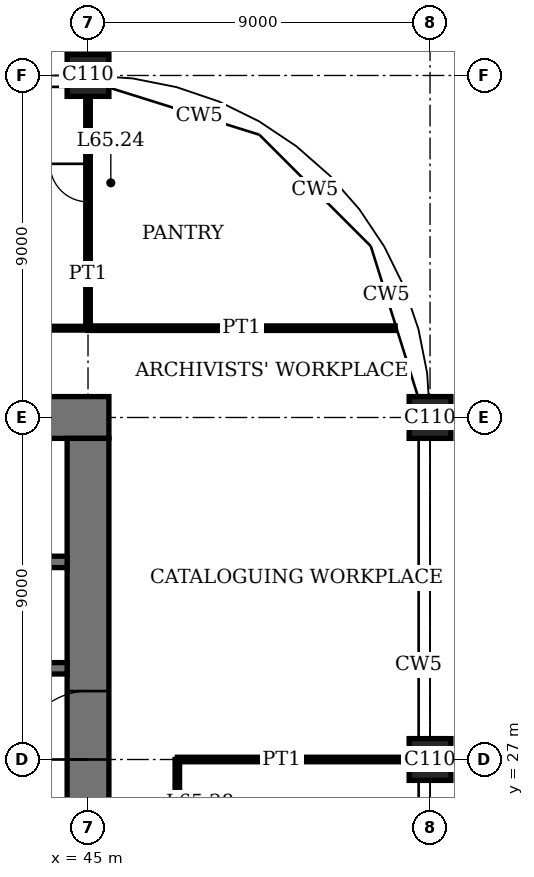
"""IFC4 building model, lengths in metres.
Left out: names, types, materials, properties, quantities, classifications, styles, units other than length and angle.
Written with IfcOpenShell. Run it as: python <this file> out.ifc"""

import sys

from ifc_helpers import new_model, si_unit, direction, frame, frame_2d, origin, origin_2d, place, context, subcontext, project, spatial, rectangle, extrude, element, fill, save


model = new_model("IFC4")
c1 = context("Model", 3, precision=1e-05, world=origin(), true_north=direction((0.0, 1.0)))
c2 = subcontext(c1, "Body", "Model", "MODEL_VIEW")
j1 = project(units=[si_unit("LENGTHUNIT", "METRE"), si_unit("PLANEANGLEUNIT", "RADIAN")], contexts=[c1])
p1 = place(None, origin())
s1 = spatial("IfcSite", under=j1, at=p1, CompositionType="ELEMENT")
p2 = place(p1, origin())
s2 = spatial("IfcBuilding", under=s1, at=p2, CompositionType="ELEMENT")
p3 = place(p2, frame((0.0, 0.0, 267.4)))
s3 = spatial("IfcBuildingStorey", under=s2, at=p3, CompositionType="ELEMENT", Elevation=267.4)
for number, where, z_axis, x_axis in (
    (1, (45.0, 45.0, 0.0), (0.0, 0.0, 1.0), (1.0, 0.0, 0.0)),
    (2, (54.0, 27.0, 0.0), (0.0, 0.0, 1.0), (1.0, 0.0, 0.0)),
    (3, (54.0, 36.0, 0.0), (0.0, 0.0, 1.0), (1.0, 0.0, 0.0)),
):
    element("IfcColumn", number, at=place(p3, frame(where, z_axis=z_axis, x_axis=x_axis)), inside=s3, PredefinedType="COLUMN", context=c2, shape_type="SweptSolid", body=[
        extrude(rectangle(XDim=1.1, YDim=1.1, at=origin_2d()), origin(), (0.0, 0.0, 1.0), 4.0),
    ])
p4 = place(p3, frame((45.55, 36.0, 0.0), z_axis=(0.0, 0.0, 1.0), x_axis=(-1.0, 0.0, 0.0)))
e4 = element("IfcWall", 4, at=p4, inside=s3, PredefinedType="SHEAR", context=c2, shape_type="SweptSolid", body=[
    extrude(rectangle(XDim=28.1, YDim=1.1, at=frame_2d((14.05, 0.0))), origin(), (0.0, 0.0, 1.0), 4.0),
])
p5 = place(p4, frame((11.55, 0.0, 0.0)))
e5 = element("IfcOpeningElement", 5, at=p5, cuts=e4, PredefinedType="OPENING", context=c2, shape_type="SweptSolid", body=[
    extrude(rectangle(XDim=1.0, YDim=2.4, at=frame_2d((0.5, 1.2))), frame((0.0, 0.56, 0.0), z_axis=(0.0, -1.0, 0.0), x_axis=(1.0, 0.0, 0.0)), (0.0, 0.0, 1.0), 1.12),
])
p6 = place(p4, frame((16.55, 0.0, 0.0)))
e6 = element("IfcOpeningElement", 6, at=p6, cuts=e4, PredefinedType="OPENING", context=c2, shape_type="SweptSolid", body=[
    extrude(rectangle(XDim=1.0, YDim=2.4, at=frame_2d((0.5, 1.2))), frame((0.0, 0.56, 0.0), z_axis=(0.0, -1.0, 0.0), x_axis=(1.0, 0.0, 0.0)), (0.0, 0.0, 1.0), 1.12),
])
p7 = place(p4, frame((20.0, 0.0, 0.0)))
e7 = element("IfcOpeningElement", 7, at=p7, cuts=e4, PredefinedType="OPENING", context=c2, shape_type="SweptSolid", body=[
    extrude(rectangle(XDim=1.1, YDim=2.4, at=frame_2d((0.55, 1.2))), frame((0.0, 0.56, 0.0), z_axis=(0.0, -1.0, 0.0), x_axis=(1.0, 0.0, 0.0)), (0.0, 0.0, 1.0), 1.12),
])
p8 = place(p4, frame((24.05, 0.0, 0.0)))
e8 = element("IfcOpeningElement", 8, at=p8, cuts=e4, PredefinedType="OPENING", context=c2, shape_type="SweptSolid", body=[
    extrude(rectangle(XDim=1.0, YDim=2.4, at=frame_2d((0.5, 1.2))), frame((0.0, 0.56, 0.0), z_axis=(0.0, -1.0, 0.0), x_axis=(1.0, 0.0, 0.0)), (0.0, 0.0, 1.0), 1.12),
])
p9 = place(p3, frame((45.0, 18.55, 0.0), z_axis=(0.0, 0.0, 1.0), x_axis=(0.0, 1.0, 0.0)))
e9 = element("IfcWall", 9, at=p9, inside=s3, PredefinedType="SHEAR", context=c2, shape_type="SweptSolid", body=[
    extrude(rectangle(XDim=16.9, YDim=1.1, at=frame_2d((8.45, 0.0))), origin(), (0.0, 0.0, 1.0), 4.0),
])
p10 = place(p9, frame((8.45, 0.0, 0.0)))
e10 = element("IfcOpeningElement", 10, at=p10, cuts=e9, PredefinedType="OPENING", context=c2, shape_type="SweptSolid", body=[
    extrude(rectangle(XDim=1.8, YDim=2.4, at=frame_2d((0.9, 1.2))), frame((0.0, 0.56, 0.0), z_axis=(0.0, -1.0, 0.0), x_axis=(1.0, 0.0, 0.0)), (0.0, 0.0, 1.0), 1.12),
])
p11 = place(p3, frame((36.15, 32.2, 0.0), z_axis=(0.0, 0.0, 1.0), x_axis=(1.0, 0.0, 0.0)))
e11 = element("IfcWall", 11, at=p11, inside=s3, PredefinedType="SHEAR", context=c2, shape_type="SweptSolid", body=[
    extrude(rectangle(XDim=8.3, YDim=0.3, at=frame_2d((4.15, 0.0))), origin(), (0.0, 0.0, 1.0), 4.0),
])
p12 = place(p11, frame((0.45, 0.0, 0.0)))
e12 = element("IfcOpeningElement", 12, at=p12, cuts=e11, PredefinedType="OPENING", context=c2, shape_type="SweptSolid", body=[
    extrude(rectangle(XDim=1.0, YDim=2.4, at=frame_2d((0.5, 1.2))), frame((0.0, 0.16, 0.0), z_axis=(0.0, -1.0, 0.0), x_axis=(1.0, 0.0, 0.0)), (0.0, 0.0, 1.0), 0.32),
])
p13 = place(p3, frame((18.55, 29.4, 0.0), z_axis=(0.0, 0.0, 1.0), x_axis=(1.0, 0.0, 0.0)))
e13 = element("IfcWall", 13, at=p13, inside=s3, PredefinedType="SHEAR", context=c2, shape_type="SweptSolid", body=[
    extrude(rectangle(XDim=25.9, YDim=0.3, at=frame_2d((12.95, 0.0))), origin(), (0.0, 0.0, 1.0), 4.0),
])
p14 = place(p13, frame((19.95, 0.0, 0.0)))
e14 = element("IfcOpeningElement", 14, at=p14, cuts=e13, PredefinedType="OPENING", context=c2, shape_type="SweptSolid", body=[
    extrude(rectangle(XDim=1.0, YDim=2.4, at=frame_2d((0.5, 1.2))), frame((0.0, 0.16, 0.0), z_axis=(0.0, -1.0, 0.0), x_axis=(1.0, 0.0, 0.0)), (0.0, 0.0, 1.0), 0.32),
])
p15 = place(p13, frame((0.5, 0.0, 0.0)))
e15 = element("IfcOpeningElement", 15, at=p15, cuts=e13, PredefinedType="OPENING", context=c2, shape_type="SweptSolid", body=[
    extrude(rectangle(XDim=0.9, YDim=2.1, at=frame_2d((0.45, 1.05))), frame((0.0, 0.16, 0.0), z_axis=(0.0, -1.0, 0.0), x_axis=(1.0, 0.0, 0.0)), (0.0, 0.0, 1.0), 0.32),
])
p16 = place(p13, frame((15.45, 0.0, 0.0)))
e16 = element("IfcOpeningElement", 16, at=p16, cuts=e13, PredefinedType="OPENING", context=c2, shape_type="SweptSolid", body=[
    extrude(rectangle(XDim=1.0, YDim=2.4, at=frame_2d((0.5, 1.2))), frame((0.0, 0.16, 0.0), z_axis=(0.0, -1.0, 0.0), x_axis=(1.0, 0.0, 0.0)), (0.0, 0.0, 1.0), 0.32),
])
p17 = place(p13, frame((12.45, 0.0, 0.0)))
e17 = element("IfcOpeningElement", 17, at=p17, cuts=e13, PredefinedType="OPENING", context=c2, shape_type="SweptSolid", body=[
    extrude(rectangle(XDim=1.0, YDim=2.4, at=frame_2d((0.5, 1.2))), frame((0.0, 0.16, 0.0), z_axis=(0.0, -1.0, 0.0), x_axis=(1.0, 0.0, 0.0)), (0.0, 0.0, 1.0), 0.32),
])
p18 = place(p13, frame((9.45, 0.0, 0.0)))
e18 = element("IfcOpeningElement", 18, at=p18, cuts=e13, PredefinedType="OPENING", context=c2, shape_type="SweptSolid", body=[
    extrude(rectangle(XDim=1.0, YDim=2.4, at=frame_2d((0.5, 1.2))), frame((0.0, 0.16, 0.0), z_axis=(0.0, -1.0, 0.0), x_axis=(1.0, 0.0, 0.0)), (0.0, 0.0, 1.0), 0.32),
])
p19 = place(p13, frame((6.45, 0.0, 0.0)))
e19 = element("IfcOpeningElement", 19, at=p19, cuts=e13, PredefinedType="OPENING", context=c2, shape_type="SweptSolid", body=[
    extrude(rectangle(XDim=1.0, YDim=2.4, at=frame_2d((0.5, 1.2))), frame((0.0, 0.16, 0.0), z_axis=(0.0, -1.0, 0.0), x_axis=(1.0, 0.0, 0.0)), (0.0, 0.0, 1.0), 0.32),
])
p20 = place(p13, frame((3.3, 0.0, 0.0)))
e20 = element("IfcOpeningElement", 20, at=p20, cuts=e13, PredefinedType="OPENING", context=c2, shape_type="SweptSolid", body=[
    extrude(rectangle(XDim=1.3, YDim=2.4, at=frame_2d((0.65, 1.2))), frame((0.0, 0.16, 0.0), z_axis=(0.0, -1.0, 0.0), x_axis=(1.0, 0.0, 0.0)), (0.0, 0.0, 1.0), 0.32),
])
p21 = place(p3, frame((47.35, 27.0, 0.0), z_axis=(0.0, 0.0, 1.0), x_axis=(1.0, 0.0, 0.0)))
e21 = element("IfcWall", 21, at=p21, inside=s3, PredefinedType="PARTITIONING", context=c2, shape_type="SweptSolid", body=[
    extrude(rectangle(XDim=6.1, YDim=0.12, at=frame_2d((3.05, 0.0))), origin(), (0.0, 0.0, 1.0), 3.05),
])
p22 = place(p3, frame((45.0, 38.35, 0.0), z_axis=(0.0, 0.0, 1.0), x_axis=(1.0, 0.0, 0.0)))
e22 = element("IfcWall", 22, at=p22, inside=s3, PredefinedType="PARTITIONING", context=c2, shape_type="SweptSolid", body=[
    extrude(rectangle(XDim=8.082, YDim=0.12, at=frame_2d((4.041, 0.0))), origin(), (0.0, 0.0, 1.0), 3.75),
])
p23 = place(p3, frame((15.6, 38.35, 0.0), z_axis=(0.0, 0.0, 1.0), x_axis=(1.0, 0.0, 0.0)))
e23 = element("IfcWall", 23, at=p23, inside=s3, PredefinedType="PARTITIONING", context=c2, shape_type="SweptSolid", body=[
    extrude(rectangle(XDim=29.4, YDim=0.1, at=frame_2d((14.7, 0.0))), origin(), (0.0, 0.0, 1.0), 3.75),
])
p24 = place(p23, frame((14.2, 0.0, 0.0)))
e24 = element("IfcOpeningElement", 24, at=p24, cuts=e23, PredefinedType="OPENING", context=c2, shape_type="SweptSolid", body=[
    extrude(rectangle(XDim=1.0, YDim=2.4, at=frame_2d((0.5, 1.2))), frame((0.0, 0.06, 0.0), z_axis=(0.0, -1.0, 0.0), x_axis=(1.0, 0.0, 0.0)), (0.0, 0.0, 1.0), 0.12),
])
p25 = place(p3, frame((45.0, 38.35, 0.0), z_axis=(0.0, 0.0, 1.0), x_axis=(0.0, 1.0, 0.0)))
e25 = element("IfcWall", 25, at=p25, inside=s3, PredefinedType="PARTITIONING", context=c2, shape_type="SweptSolid", body=[
    extrude(rectangle(XDim=6.1, YDim=0.12, at=frame_2d((3.05, 0.0))), origin(), (0.0, 0.0, 1.0), 3.05),
])
p26 = place(p25, frame((3.325, 0.0, 0.0)))
e26 = element("IfcOpeningElement", 26, at=p26, cuts=e25, PredefinedType="OPENING", context=c2, shape_type="SweptSolid", body=[
    extrude(rectangle(XDim=1.0, YDim=2.4, at=frame_2d((0.5, 1.2))), frame((0.0, 0.07, 0.0), z_axis=(0.0, -1.0, 0.0), x_axis=(1.0, 0.0, 0.0)), (0.0, 0.0, 1.0), 0.14),
])
p27 = place(p3, frame((47.35, 22.5, 0.0), z_axis=(0.0, 0.0, 1.0), x_axis=(0.0, 1.0, 0.0)))
e27 = element("IfcWall", 27, at=p27, inside=s3, PredefinedType="PARTITIONING", context=c2, shape_type="SweptSolid", body=[
    extrude(rectangle(XDim=4.5, YDim=0.12, at=frame_2d((2.25, 0.0))), origin(), (0.0, 0.0, 1.0), 3.75),
])
p28 = place(p27, frame((1.75, 0.0, 0.0)))
e28 = element("IfcOpeningElement", 28, at=p28, cuts=e27, PredefinedType="OPENING", context=c2, shape_type="SweptSolid", body=[
    extrude(rectangle(XDim=1.0, YDim=2.4, at=frame_2d((0.5, 1.2))), frame((0.0, 0.07, 0.0), z_axis=(0.0, -1.0, 0.0), x_axis=(1.0, 0.0, 0.0)), (0.0, 0.0, 1.0), 0.14),
])
p29 = place(p10, origin())
e29 = element("IfcDoor", 29, at=p29, inside=s3, OperationType="DOUBLE_DOOR_DOUBLE_SWING", PredefinedType="DOOR", context=c2, shape_type="SweptSolid", body=[
    extrude(rectangle(XDim=1.8, YDim=2.4, at=frame_2d((0.9, 1.2))), frame((0.0, 0.03, 0.0), z_axis=(0.0, -1.0, 0.0), x_axis=(1.0, 0.0, 0.0)), (0.0, 0.0, 1.0), 0.06),
    extrude(rectangle(XDim=0.04, YDim=2.4, at=frame_2d((0.02, 1.2))), frame((0.0, 0.55, 0.0), z_axis=(0.0, -1.0, 0.0), x_axis=(1.0, 0.0, 0.0)), (0.0, 0.0, 1.0), 1.1),
    extrude(rectangle(XDim=0.04, YDim=2.4, at=frame_2d((1.78, 1.2))), frame((0.0, 0.55, 0.0), z_axis=(0.0, -1.0, 0.0), x_axis=(1.0, 0.0, 0.0)), (0.0, 0.0, 1.0), 1.1),
    extrude(rectangle(XDim=1.8, YDim=0.04, at=frame_2d((0.9, 2.38))), frame((0.0, 0.55, 0.0), z_axis=(0.0, -1.0, 0.0), x_axis=(1.0, 0.0, 0.0)), (0.0, 0.0, 1.0), 1.1),
])
fill(e10, e29)
p30 = place(p26, origin())
e30 = element("IfcDoor", 30, at=p30, inside=s3, OperationType="SINGLE_SWING_LEFT", PredefinedType="DOOR", context=c2, shape_type="SweptSolid", body=[
    extrude(rectangle(XDim=1.0, YDim=2.4, at=frame_2d((0.5, 1.2))), frame((0.0, 0.025, 0.0), z_axis=(0.0, -1.0, 0.0), x_axis=(1.0, 0.0, 0.0)), (0.0, 0.0, 1.0), 0.05),
])
fill(e26, e30)
save(model, sys.argv[1])
